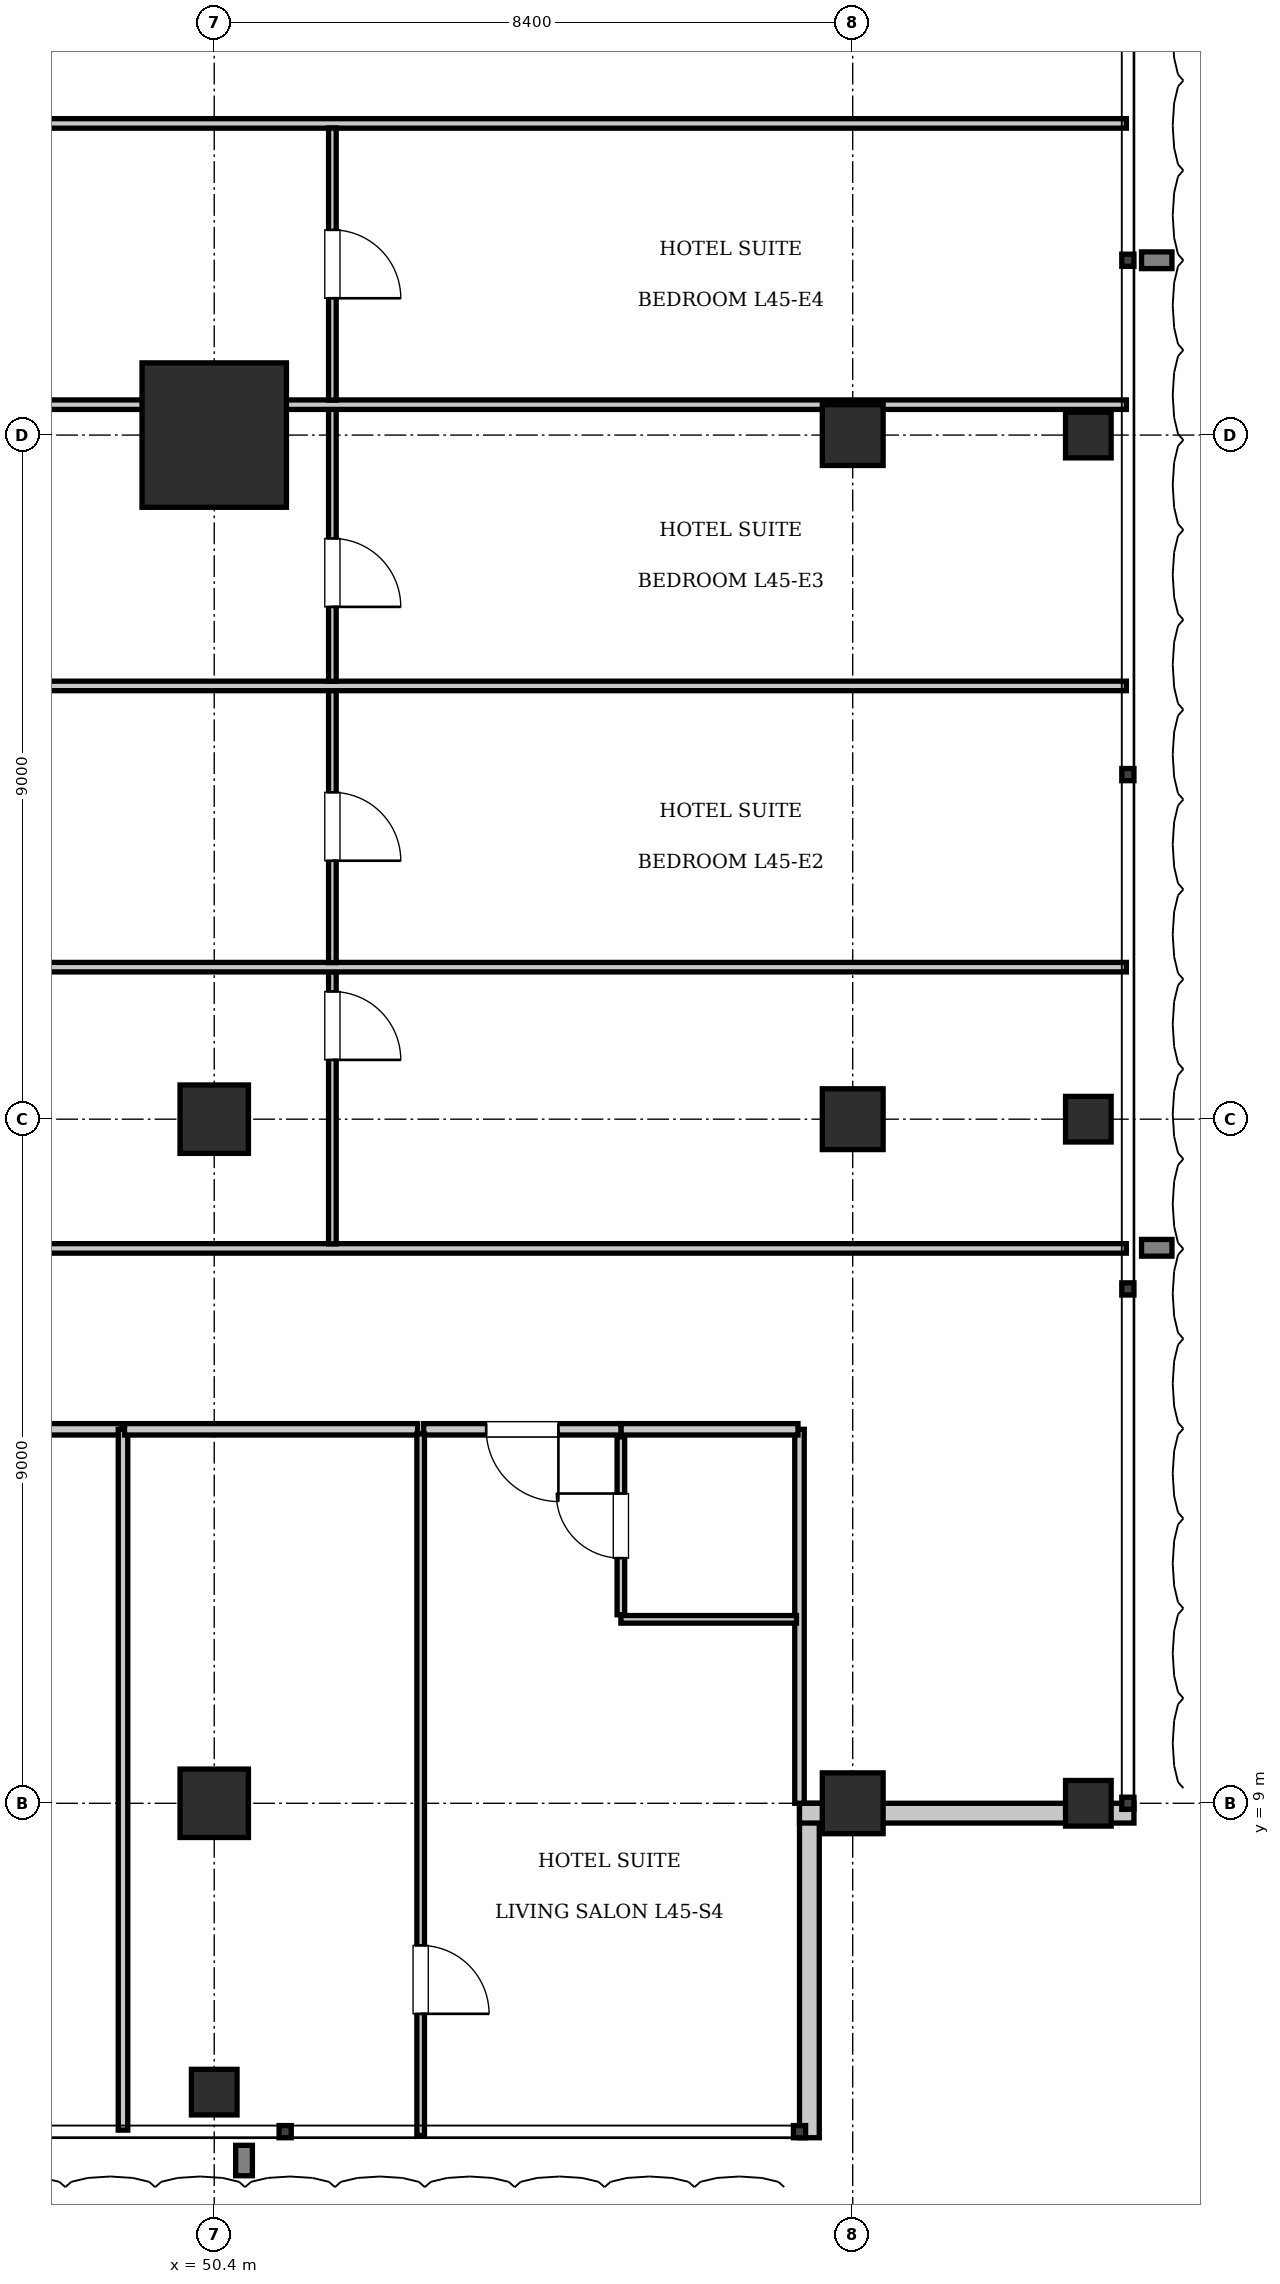
"""IFC4 building model, lengths in metres.
Left out: names, types, materials, properties, quantities, classifications, styles, units other than length and angle.
Written with IfcOpenShell. Run it as: python <this file> out.ifc"""

import sys

from ifc_helpers import new_model, si_unit, direction, frame, frame_2d, origin, origin_2d, place, context, subcontext, project, spatial, rectangle, i_section, extrude, element, fill, save


model = new_model("IFC4")
c1 = context("Model", 3, precision=1e-05, world=origin(), true_north=direction((0.0, 1.0)))
c2 = subcontext(c1, "Body", "Model", "MODEL_VIEW")
j1 = project(units=[si_unit("LENGTHUNIT", "METRE"), si_unit("PLANEANGLEUNIT", "RADIAN")], contexts=[c1])
p1 = place(None, origin())
s1 = spatial("IfcSite", under=j1, at=p1, CompositionType="ELEMENT")
p2 = place(p1, origin())
s2 = spatial("IfcBuilding", under=s1, at=p2, CompositionType="ELEMENT")
p3 = place(p2, frame((0.0, 0.0, 185.15)))
s3 = spatial("IfcBuildingStorey", under=s2, at=p3, CompositionType="ELEMENT", Elevation=185.15)
p4 = place(p3, frame((50.4, 27.0, 0.0), z_axis=(0.0, 0.0, 1.0), x_axis=(1.0, 0.0, 0.0)))
e1 = element("IfcColumn", 1, at=p4, inside=s3, PredefinedType="COLUMN", context=c2, shape_type="SweptSolid", body=[
    extrude(rectangle(XDim=1.9, YDim=1.9, at=origin_2d()), origin(), (0.0, 0.0, 1.0), 3.85),
])
for number, where, z_axis, x_axis in (
    (2, (50.4, 18.0, 0.0), (0.0, 0.0, 1.0), (1.0, 0.0, 0.0)),
    (3, (50.4, 9.0, 0.0), (0.0, 0.0, 1.0), (1.0, 0.0, 0.0)),
):
    element("IfcColumn", number, at=place(p3, frame(where, z_axis=z_axis, x_axis=x_axis)), inside=s3, PredefinedType="COLUMN", context=c2, shape_type="SweptSolid", body=[
        extrude(rectangle(XDim=0.9, YDim=0.9, at=origin_2d()), origin(), (0.0, 0.0, 1.0), 3.85),
    ])
for number, where, z_axis, x_axis in (
    (4, (58.8, 9.0, 0.0), (0.0, 0.0, 1.0), (1.0, 0.0, 0.0)),
    (5, (58.8, 18.0, 0.0), (0.0, 0.0, 1.0), (1.0, 0.0, 0.0)),
    (6, (58.8, 27.0, 0.0), (0.0, 0.0, 1.0), (1.0, 0.0, 0.0)),
):
    element("IfcColumn", number, at=place(p3, frame(where, z_axis=z_axis, x_axis=x_axis)), inside=s3, PredefinedType="COLUMN", context=c2, shape_type="SweptSolid", body=[
        extrude(rectangle(XDim=0.8, YDim=0.8, at=origin_2d()), origin(), (0.0, 0.0, 1.0), 3.85),
    ])
for number, where, z_axis, x_axis in (
    (7, (61.9, 9.0, 0.0), (0.0, 0.0, 1.0), (1.0, 0.0, 0.0)),
    (8, (61.9, 18.0, 0.0), (0.0, 0.0, 1.0), (1.0, 0.0, 0.0)),
    (9, (61.9, 27.0, 0.0), (0.0, 0.0, 1.0), (1.0, 0.0, 0.0)),
    (10, (50.4, 5.2, 0.0), (0.0, 0.0, 1.0), (1.0, 0.0, 0.0)),
):
    element("IfcColumn", number, at=place(p3, frame(where, z_axis=z_axis, x_axis=x_axis)), inside=s3, PredefinedType="COLUMN", context=c2, shape_type="SweptSolid", body=[
        extrude(i_section(OverallWidth=0.6, OverallDepth=0.6, WebThickness=0.025, FlangeThickness=0.038, at=origin_2d()), origin(), (0.0, 0.0, 1.0), 3.85),
    ])
p5 = place(p3, frame((58.23, 9.0, 0.0), z_axis=(0.0, 0.0, 1.0), x_axis=(0.0, -1.0, 0.0)))
e11 = element("IfcWall", 11, at=p5, inside=s3, PredefinedType="SOLIDWALL", context=c2, shape_type="SweptSolid", body=[
    extrude(rectangle(XDim=4.4, YDim=0.26, at=frame_2d((2.2, 0.0))), origin(), (0.0, 0.0, 1.0), 3.61),
])
p6 = place(p3, frame((62.5, 8.87, 0.0), z_axis=(0.0, 0.0, 1.0), x_axis=(-1.0, 0.0, 0.0)))
e12 = element("IfcWall", 12, at=p6, inside=s3, PredefinedType="SOLIDWALL", context=c2, shape_type="SweptSolid", body=[
    extrude(rectangle(XDim=4.4, YDim=0.26, at=frame_2d((2.2, 0.0))), origin(), (0.0, 0.0, 1.0), 3.007),
])
p7 = place(p3, frame((58.1, 9.0, 0.0), z_axis=(0.0, 0.0, 1.0), x_axis=(0.0, 1.0, 0.0)))
e13 = element("IfcWall", 13, at=p7, inside=s3, PredefinedType="PARTITIONING", context=c2, shape_type="SweptSolid", body=[
    extrude(rectangle(XDim=4.92, YDim=0.125, at=frame_2d((2.46, 0.0))), origin(), (0.0, 0.0, 1.0), 3.61),
])
p8 = place(p3, frame((44.224, 13.92, 0.0), z_axis=(0.0, 0.0, 1.0), x_axis=(1.0, 0.0, 0.0)))
e14 = element("IfcWall", 14, at=p8, inside=s3, PredefinedType="PARTITIONING", context=c2, shape_type="SweptSolid", body=[
    extrude(rectangle(XDim=4.956, YDim=0.15, at=frame_2d((2.478, 0.0))), origin(), (0.0, 0.0, 1.0), 3.61),
])
p9 = place(p3, frame((49.2, 4.7, 0.0), z_axis=(0.0, 0.0, 1.0), x_axis=(0.0, 1.0, 0.0)))
e15 = element("IfcWall", 15, at=p9, inside=s3, PredefinedType="PARTITIONING", context=c2, shape_type="SweptSolid", body=[
    extrude(rectangle(XDim=9.22, YDim=0.125, at=frame_2d((4.61, 0.0))), origin(), (0.0, 0.0, 1.0), 3.61),
])
p10 = place(p3, frame((55.75, 13.92, 0.0), z_axis=(0.0, 0.0, 1.0), x_axis=(1.0, 0.0, 0.0)))
e16 = element("IfcWall", 16, at=p10, inside=s3, PredefinedType="PARTITIONING", context=c2, shape_type="SweptSolid", body=[
    extrude(rectangle(XDim=2.33, YDim=0.15, at=frame_2d((1.165, 0.0))), origin(), (0.0, 0.0, 1.0), 3.61),
])
p11 = place(p3, frame((55.75, 11.42, 0.0), z_axis=(0.0, 0.0, 1.0), x_axis=(1.0, 0.0, 0.0)))
e17 = element("IfcWall", 17, at=p11, inside=s3, PredefinedType="PARTITIONING", context=c2, shape_type="SweptSolid", body=[
    extrude(rectangle(XDim=2.31, YDim=0.1, at=frame_2d((1.155, 0.0))), origin(), (0.0, 0.0, 1.0), 3.61),
])
p12 = place(p3, frame((55.75, 11.48, 0.0), z_axis=(0.0, 0.0, 1.0), x_axis=(0.0, 1.0, 0.0)))
e18 = element("IfcWall", 18, at=p12, inside=s3, PredefinedType="PARTITIONING", context=c2, shape_type="SweptSolid", body=[
    extrude(rectangle(XDim=2.34, YDim=0.1, at=frame_2d((1.17, 0.0))), origin(), (0.0, 0.0, 1.0), 3.61),
])
p13 = place(p12, frame((0.745, 0.0, 0.0)))
e19 = element("IfcOpeningElement", 19, at=p13, cuts=e18, PredefinedType="OPENING", context=c2, shape_type="SweptSolid", body=[
    extrude(rectangle(XDim=0.85, YDim=2.1, at=frame_2d((0.425, 1.05))), frame((0.0, 0.06, 0.0), z_axis=(0.0, -1.0, 0.0), x_axis=(1.0, 0.0, 0.0)), (0.0, 0.0, 1.0), 0.12),
])
p14 = place(p3, frame((49.22, 13.92, 0.0), z_axis=(0.0, 0.0, 1.0), x_axis=(1.0, 0.0, 0.0)))
e20 = element("IfcWall", 20, at=p14, inside=s3, PredefinedType="PARTITIONING", context=c2, shape_type="SweptSolid", body=[
    extrude(rectangle(XDim=3.856, YDim=0.15, at=frame_2d((1.928, 0.0))), origin(), (0.0, 0.0, 1.0), 3.61),
])
p15 = place(p3, frame((53.156, 13.92, 0.0), z_axis=(0.0, 0.0, 1.0), x_axis=(1.0, 0.0, 0.0)))
e21 = element("IfcWall", 21, at=p15, inside=s3, PredefinedType="PARTITIONING", context=c2, shape_type="SweptSolid", body=[
    extrude(rectangle(XDim=2.594, YDim=0.15, at=frame_2d((1.297, 0.0))), origin(), (0.0, 0.0, 1.0), 3.61),
])
p16 = place(p15, frame((0.822, 0.0, 0.0)))
e22 = element("IfcOpeningElement", 22, at=p16, cuts=e21, PredefinedType="OPENING", context=c2, shape_type="SweptSolid", body=[
    extrude(rectangle(XDim=0.95, YDim=2.15, at=frame_2d((0.475, 1.075))), frame((0.0, 0.085, 0.0), z_axis=(0.0, -1.0, 0.0), x_axis=(1.0, 0.0, 0.0)), (0.0, 0.0, 1.0), 0.17),
])
p17 = place(p3, frame((53.116, 4.63, 0.0), z_axis=(0.0, 0.0, 1.0), x_axis=(0.0, 1.0, 0.0)))
e23 = element("IfcWall", 23, at=p17, inside=s3, PredefinedType="PARTITIONING", context=c2, shape_type="SweptSolid", body=[
    extrude(rectangle(XDim=9.23, YDim=0.1, at=frame_2d((4.615, 0.0))), origin(), (0.0, 0.0, 1.0), 3.61),
])
p18 = place(p17, frame((1.6, 0.0, 0.0)))
e24 = element("IfcOpeningElement", 24, at=p18, cuts=e23, PredefinedType="OPENING", context=c2, shape_type="SweptSolid", body=[
    extrude(rectangle(XDim=0.9, YDim=2.1, at=frame_2d((0.45, 1.05))), frame((0.0, 0.06, 0.0), z_axis=(0.0, -1.0, 0.0), x_axis=(1.0, 0.0, 0.0)), (0.0, 0.0, 1.0), 0.12),
])
for number, where, z_axis, x_axis in (
    (25, (38.08, 16.3, 0.0), (0.0, 0.0, 1.0), (1.0, 0.0, 0.0)),
    (26, (38.08, 31.1, 0.0), (0.0, 0.0, 1.0), (1.0, 0.0, 0.0)),
):
    element("IfcWall", number, at=place(p3, frame(where, z_axis=z_axis, x_axis=x_axis)), inside=s3, PredefinedType="PARTITIONING", context=c2, shape_type="SweptSolid", body=[
        extrude(rectangle(XDim=24.32, YDim=0.125, at=frame_2d((12.16, 0.0))), origin(), (0.0, 0.0, 1.0), 3.61),
    ])
p19 = place(p3, frame((51.954, 16.36, 0.0), z_axis=(0.0, 0.0, 1.0), x_axis=(0.0, 1.0, 0.0)))
e27 = element("IfcWall", 27, at=p19, inside=s3, PredefinedType="PARTITIONING", context=c2, shape_type="SweptSolid", body=[
    extrude(rectangle(XDim=3.58, YDim=0.1, at=frame_2d((1.79, 0.0))), origin(), (0.0, 0.0, 1.0), 3.61),
])
p20 = place(p19, frame((2.42, 0.0, 0.0)))
e28 = element("IfcOpeningElement", 28, at=p20, cuts=e27, PredefinedType="OPENING", context=c2, shape_type="SweptSolid", body=[
    extrude(rectangle(XDim=0.9, YDim=2.1, at=frame_2d((0.45, 1.05))), frame((0.0, 0.06, 0.0), z_axis=(0.0, -1.0, 0.0), x_axis=(1.0, 0.0, 0.0)), (0.0, 0.0, 1.0), 0.12),
])
p21 = place(p3, frame((38.08, 20.0, 0.0), z_axis=(0.0, 0.0, 1.0), x_axis=(1.0, 0.0, 0.0)))
e29 = element("IfcWall", 29, at=p21, inside=s3, PredefinedType="PARTITIONING", context=c2, shape_type="SweptSolid", body=[
    extrude(rectangle(XDim=24.32, YDim=0.125, at=frame_2d((12.16, 0.0))), origin(), (0.0, 0.0, 1.0), 3.61),
])
p22 = place(p3, frame((51.954, 20.06, 0.0), z_axis=(0.0, 0.0, 1.0), x_axis=(0.0, 1.0, 0.0)))
e30 = element("IfcWall", 30, at=p22, inside=s3, PredefinedType="PARTITIONING", context=c2, shape_type="SweptSolid", body=[
    extrude(rectangle(XDim=3.58, YDim=0.1, at=frame_2d((1.79, 0.0))), origin(), (0.0, 0.0, 1.0), 3.61),
])
p23 = place(p22, frame((1.34, 0.0, 0.0)))
e31 = element("IfcOpeningElement", 31, at=p23, cuts=e30, PredefinedType="OPENING", context=c2, shape_type="SweptSolid", body=[
    extrude(rectangle(XDim=0.9, YDim=2.1, at=frame_2d((0.45, 1.05))), frame((0.0, 0.06, 0.0), z_axis=(0.0, -1.0, 0.0), x_axis=(1.0, 0.0, 0.0)), (0.0, 0.0, 1.0), 0.12),
])
p24 = place(p3, frame((38.08, 23.7, 0.0), z_axis=(0.0, 0.0, 1.0), x_axis=(1.0, 0.0, 0.0)))
e32 = element("IfcWall", 32, at=p24, inside=s3, PredefinedType="PARTITIONING", context=c2, shape_type="SweptSolid", body=[
    extrude(rectangle(XDim=24.32, YDim=0.125, at=frame_2d((12.16, 0.0))), origin(), (0.0, 0.0, 1.0), 3.61),
])
p25 = place(p3, frame((51.954, 23.76, 0.0), z_axis=(0.0, 0.0, 1.0), x_axis=(0.0, 1.0, 0.0)))
e33 = element("IfcWall", 33, at=p25, inside=s3, PredefinedType="PARTITIONING", context=c2, shape_type="SweptSolid", body=[
    extrude(rectangle(XDim=3.58, YDim=0.1, at=frame_2d((1.79, 0.0))), origin(), (0.0, 0.0, 1.0), 3.61),
])
p26 = place(p25, frame((0.98, 0.0, 0.0)))
e34 = element("IfcOpeningElement", 34, at=p26, cuts=e33, PredefinedType="OPENING", context=c2, shape_type="SweptSolid", body=[
    extrude(rectangle(XDim=0.9, YDim=2.1, at=frame_2d((0.45, 1.05))), frame((0.0, 0.06, 0.0), z_axis=(0.0, -1.0, 0.0), x_axis=(1.0, 0.0, 0.0)), (0.0, 0.0, 1.0), 0.12),
])
p27 = place(p3, frame((38.08, 27.4, 0.0), z_axis=(0.0, 0.0, 1.0), x_axis=(1.0, 0.0, 0.0)))
e35 = element("IfcWall", 35, at=p27, inside=s3, PredefinedType="PARTITIONING", context=c2, shape_type="SweptSolid", body=[
    extrude(rectangle(XDim=24.32, YDim=0.125, at=frame_2d((12.16, 0.0))), origin(), (0.0, 0.0, 1.0), 3.61),
])
p28 = place(p3, frame((51.954, 27.46, 0.0), z_axis=(0.0, 0.0, 1.0), x_axis=(0.0, 1.0, 0.0)))
e36 = element("IfcWall", 36, at=p28, inside=s3, PredefinedType="PARTITIONING", context=c2, shape_type="SweptSolid", body=[
    extrude(rectangle(XDim=3.58, YDim=0.1, at=frame_2d((1.79, 0.0))), origin(), (0.0, 0.0, 1.0), 3.61),
])
p29 = place(p28, frame((1.34, 0.0, 0.0)))
e37 = element("IfcOpeningElement", 37, at=p29, cuts=e36, PredefinedType="OPENING", context=c2, shape_type="SweptSolid", body=[
    extrude(rectangle(XDim=0.9, YDim=2.1, at=frame_2d((0.45, 1.05))), frame((0.0, 0.06, 0.0), z_axis=(0.0, -1.0, 0.0), x_axis=(1.0, 0.0, 0.0)), (0.0, 0.0, 1.0), 0.12),
])
p30 = place(p13, origin())
e38 = element("IfcDoor", 38, at=p30, inside=s3, OperationType="SINGLE_SWING_RIGHT", PredefinedType="DOOR", context=c2, shape_type="SweptSolid", body=[
    extrude(rectangle(XDim=0.85, YDim=2.1, at=frame_2d((0.425, 1.05))), frame((0.0, 0.025, 0.0), z_axis=(0.0, -1.0, 0.0), x_axis=(1.0, 0.0, 0.0)), (0.0, 0.0, 1.0), 0.05),
])
fill(e19, e38)
p31 = place(p16, frame((0.95, 0.0, 0.0), z_axis=(0.0, 0.0, 1.0), x_axis=(-1.0, 0.0, 0.0)))
e39 = element("IfcDoor", 39, at=p31, inside=s3, OperationType="SINGLE_SWING_LEFT", PredefinedType="DOOR", context=c2, shape_type="SweptSolid", body=[
    extrude(rectangle(XDim=0.95, YDim=2.15, at=frame_2d((0.475, 1.075))), frame((0.0, 0.025, 0.0), z_axis=(0.0, -1.0, 0.0), x_axis=(1.0, 0.0, 0.0)), (0.0, 0.0, 1.0), 0.05),
])
fill(e22, e39)
p32 = place(p18, frame((0.9, 0.0, 0.0), z_axis=(0.0, 0.0, 1.0), x_axis=(-1.0, 0.0, 0.0)))
e40 = element("IfcDoor", 40, at=p32, inside=s3, OperationType="SINGLE_SWING_RIGHT", PredefinedType="DOOR", context=c2, shape_type="SweptSolid", body=[
    extrude(rectangle(XDim=0.9, YDim=2.1, at=frame_2d((0.45, 1.05))), frame((0.0, 0.025, 0.0), z_axis=(0.0, -1.0, 0.0), x_axis=(1.0, 0.0, 0.0)), (0.0, 0.0, 1.0), 0.05),
])
fill(e24, e40)
p33 = place(p20, frame((0.9, 0.0, 0.0), z_axis=(0.0, 0.0, 1.0), x_axis=(-1.0, 0.0, 0.0)))
e41 = element("IfcDoor", 41, at=p33, inside=s3, OperationType="SINGLE_SWING_RIGHT", PredefinedType="DOOR", context=c2, shape_type="SweptSolid", body=[
    extrude(rectangle(XDim=0.9, YDim=2.1, at=frame_2d((0.45, 1.05))), frame((0.0, 0.025, 0.0), z_axis=(0.0, -1.0, 0.0), x_axis=(1.0, 0.0, 0.0)), (0.0, 0.0, 1.0), 0.05),
])
fill(e28, e41)
p34 = place(p23, frame((0.9, 0.0, 0.0), z_axis=(0.0, 0.0, 1.0), x_axis=(-1.0, 0.0, 0.0)))
e42 = element("IfcDoor", 42, at=p34, inside=s3, OperationType="SINGLE_SWING_RIGHT", PredefinedType="DOOR", context=c2, shape_type="SweptSolid", body=[
    extrude(rectangle(XDim=0.9, YDim=2.1, at=frame_2d((0.45, 1.05))), frame((0.0, 0.025, 0.0), z_axis=(0.0, -1.0, 0.0), x_axis=(1.0, 0.0, 0.0)), (0.0, 0.0, 1.0), 0.05),
])
fill(e31, e42)
p35 = place(p26, frame((0.9, 0.0, 0.0), z_axis=(0.0, 0.0, 1.0), x_axis=(-1.0, 0.0, 0.0)))
e43 = element("IfcDoor", 43, at=p35, inside=s3, OperationType="SINGLE_SWING_RIGHT", PredefinedType="DOOR", context=c2, shape_type="SweptSolid", body=[
    extrude(rectangle(XDim=0.9, YDim=2.1, at=frame_2d((0.45, 1.05))), frame((0.0, 0.025, 0.0), z_axis=(0.0, -1.0, 0.0), x_axis=(1.0, 0.0, 0.0)), (0.0, 0.0, 1.0), 0.05),
])
fill(e34, e43)
p36 = place(p29, frame((0.9, 0.0, 0.0), z_axis=(0.0, 0.0, 1.0), x_axis=(-1.0, 0.0, 0.0)))
e44 = element("IfcDoor", 44, at=p36, inside=s3, OperationType="SINGLE_SWING_RIGHT", PredefinedType="DOOR", context=c2, shape_type="SweptSolid", body=[
    extrude(rectangle(XDim=0.9, YDim=2.1, at=frame_2d((0.45, 1.05))), frame((0.0, 0.025, 0.0), z_axis=(0.0, -1.0, 0.0), x_axis=(1.0, 0.0, 0.0)), (0.0, 0.0, 1.0), 0.05),
])
fill(e37, e44)
save(model, sys.argv[1])
